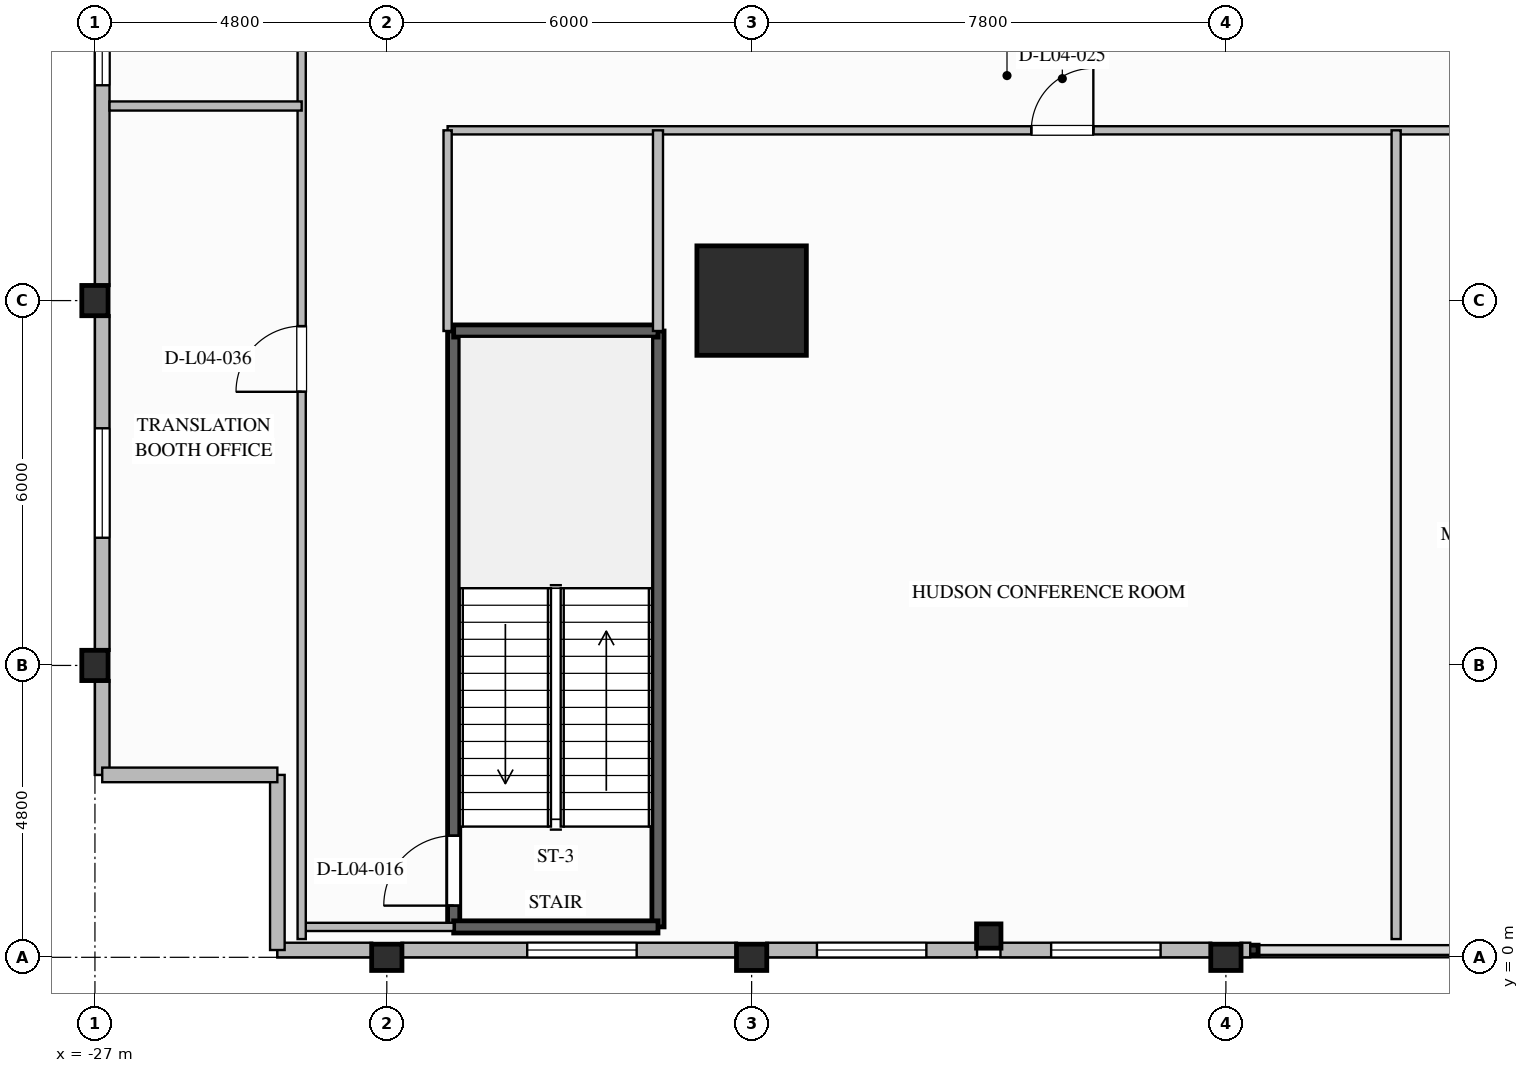
"""IFC4 building model, lengths in metres.
Left out: names, types, materials, properties, quantities, classifications, styles, units other than length and angle.
Written with IfcOpenShell. Run it as: python <this file> out.ifc"""

import sys

from ifc_helpers import new_model, si_unit, direction, frame, frame_2d, origin, origin_2d, place, context, subcontext, project, spatial, rectangle, i_section, extrude, element, fill, save


model = new_model("IFC4")
c1 = context("Model", 3, precision=1e-05, world=origin(), true_north=direction((0.0, 1.0)))
c2 = subcontext(c1, "Body", "Model", "MODEL_VIEW")
j1 = project(units=[si_unit("LENGTHUNIT", "METRE"), si_unit("PLANEANGLEUNIT", "RADIAN")], contexts=[c1])
p1 = place(None, origin())
s1 = spatial("IfcSite", under=j1, at=p1, CompositionType="ELEMENT")
p2 = place(p1, origin())
s2 = spatial("IfcBuilding", under=s1, at=p2, CompositionType="ELEMENT")
p3 = place(p2, frame((0.0, 0.0, 22.4)))
s3 = spatial("IfcBuildingStorey", under=s2, at=p3, CompositionType="ELEMENT", Elevation=22.4)
p4 = place(p3, frame((-16.2, 10.8, 0.0), z_axis=(0.0, 0.0, 1.0), x_axis=(1.0, 0.0, 0.0)))
e1 = element("IfcColumn", 1, at=p4, inside=s3, PredefinedType="COLUMN", context=c2, shape_type="SweptSolid", body=[
    extrude(rectangle(XDim=1.8, YDim=1.8, at=origin_2d()), origin(), (0.0, 0.0, 1.0), 5.2),
])
for number, where, z_axis, x_axis in (
    (2, (-27.0, 4.8, 0.0), (0.0, 0.0, 1.0), (1.0, 0.0, 0.0)),
    (3, (-27.0, 10.8, 0.0), (0.0, 0.0, 1.0), (1.0, 0.0, 0.0)),
    (4, (-22.2, 0.0, 0.0), (0.0, 0.0, 1.0), (0.0, 1.0, 0.0)),
    (5, (-16.2, 0.0, 0.0), (0.0, 0.0, 1.0), (0.0, 1.0, 0.0)),
    (6, (-8.4, 0.0, 0.0), (0.0, 0.0, 1.0), (0.0, 1.0, 0.0)),
):
    element("IfcColumn", number, at=place(p3, frame(where, z_axis=z_axis, x_axis=x_axis)), inside=s3, PredefinedType="COLUMN", context=c2, shape_type="SweptSolid", body=[
        extrude(i_section(OverallWidth=0.432, OverallDepth=0.498, WebThickness=0.056, FlangeThickness=0.089, FilletRadius=0.03, at=origin_2d()), origin(), (0.0, 0.0, 1.0), 5.2),
    ])
p5 = place(p3, frame((-12.3, 0.35, 0.0), z_axis=(0.0, 0.0, 1.0), x_axis=(1.0, 0.0, 0.0)))
e7 = element("IfcColumn", 7, at=p5, inside=s3, PredefinedType="COLUMN", context=c2, shape_type="SweptSolid", body=[
    extrude(i_section(OverallWidth=0.401, OverallDepth=0.399, WebThickness=0.025, FlangeThickness=0.04, FilletRadius=0.025, at=origin_2d()), origin(), (0.0, 0.0, 1.0), 5.2),
])
p6 = place(p3, frame((-26.88, 3.0, 0.0), z_axis=(0.0, 0.0, 1.0), x_axis=(0.0, 1.0, 0.0)))
e8 = element("IfcWall", 8, at=p6, inside=s3, PredefinedType="STANDARD", context=c2, shape_type="SweptSolid", body=[
    extrude(rectangle(XDim=1.559, YDim=0.24, at=frame_2d((0.78, 0.0))), origin(), (0.0, 0.0, 1.0), 4.85),
])
p7 = place(p3, frame((-26.88, 5.041, 0.0), z_axis=(0.0, 0.0, 1.0), x_axis=(0.0, 1.0, 0.0)))
e9 = element("IfcWall", 9, at=p7, inside=s3, PredefinedType="STANDARD", context=c2, shape_type="SweptSolid", body=[
    extrude(rectangle(XDim=5.518, YDim=0.24, at=frame_2d((2.759, 0.0))), origin(), (0.0, 0.0, 1.0), 4.155),
])
p8 = place(p7, frame((1.859, 0.0, 0.7)))
e10 = element("IfcOpeningElement", 10, at=p8, cuts=e9, PredefinedType="OPENING", context=c2, shape_type="SweptSolid", body=[
    extrude(rectangle(XDim=1.8, YDim=2.2, at=frame_2d((0.9, 1.1))), frame((0.0, 0.13, 0.0), z_axis=(0.0, -1.0, 0.0), x_axis=(1.0, 0.0, 0.0)), (0.0, 0.0, 1.0), 0.26),
])
p9 = place(p3, frame((-26.88, 11.041, 0.0), z_axis=(0.0, 0.0, 1.0), x_axis=(0.0, 1.0, 0.0)))
e11 = element("IfcWall", 11, at=p9, inside=s3, PredefinedType="STANDARD", context=c2, shape_type="SweptSolid", body=[
    extrude(rectangle(XDim=7.318, YDim=0.24, at=frame_2d((3.659, 0.0))), origin(), (0.0, 0.0, 1.0), 4.155),
])
p10 = place(p9, frame((3.3, 0.0, 0.7)))
e12 = element("IfcOpeningElement", 12, at=p10, cuts=e11, PredefinedType="OPENING", context=c2, shape_type="SweptSolid", body=[
    extrude(rectangle(XDim=2.4, YDim=2.4, at=frame_2d((1.2, 1.2))), frame((0.0, 0.13, 0.0), z_axis=(0.0, -1.0, 0.0), x_axis=(1.0, 0.0, 0.0)), (0.0, 0.0, 1.0), 0.26),
])
p11 = place(p3, frame((-22.441, 0.12, 0.0), z_axis=(0.0, 0.0, 1.0), x_axis=(-1.0, 0.0, 0.0)))
e13 = element("IfcWall", 13, at=p11, inside=s3, PredefinedType="STANDARD", context=c2, shape_type="SweptSolid", body=[
    extrude(rectangle(XDim=1.559, YDim=0.24, at=frame_2d((0.78, 0.0))), origin(), (0.0, 0.0, 1.0), 4.85),
])
p12 = place(p3, frame((-16.441, 0.12, 0.0), z_axis=(0.0, 0.0, 1.0), x_axis=(-1.0, 0.0, 0.0)))
e14 = element("IfcWall", 14, at=p12, inside=s3, PredefinedType="STANDARD", context=c2, shape_type="SweptSolid", body=[
    extrude(rectangle(XDim=5.518, YDim=0.24, at=frame_2d((2.759, 0.0))), origin(), (0.0, 0.0, 1.0), 4.155),
])
p13 = place(p12, frame((1.65, 0.0, 0.65)))
e15 = element("IfcOpeningElement", 15, at=p13, cuts=e14, PredefinedType="OPENING", context=c2, shape_type="SweptSolid", body=[
    extrude(rectangle(XDim=1.8, YDim=2.2, at=frame_2d((0.9, 1.1))), frame((0.0, 0.13, 0.0), z_axis=(0.0, -1.0, 0.0), x_axis=(1.0, 0.0, 0.0)), (0.0, 0.0, 1.0), 0.26),
])
p14 = place(p3, frame((-12.493, 0.12, 0.0), z_axis=(0.0, 0.0, 1.0), x_axis=(-1.0, 0.0, 0.0)))
e16 = element("IfcWall", 16, at=p14, inside=s3, PredefinedType="STANDARD", context=c2, shape_type="SweptSolid", body=[
    extrude(rectangle(XDim=3.466, YDim=0.24, at=frame_2d((1.733, 0.0))), origin(), (0.0, 0.0, 1.0), 4.155),
])
p15 = place(p14, frame((0.833, 0.0, 0.65)))
e17 = element("IfcOpeningElement", 17, at=p15, cuts=e16, PredefinedType="OPENING", context=c2, shape_type="SweptSolid", body=[
    extrude(rectangle(XDim=1.8, YDim=2.2, at=frame_2d((0.9, 1.1))), frame((0.0, 0.13, 0.0), z_axis=(0.0, -1.0, 0.0), x_axis=(1.0, 0.0, 0.0)), (0.0, 0.0, 1.0), 0.26),
])
p16 = place(p3, frame((-8.641, 0.12, 0.0), z_axis=(0.0, 0.0, 1.0), x_axis=(-1.0, 0.0, 0.0)))
e18 = element("IfcWall", 18, at=p16, inside=s3, PredefinedType="STANDARD", context=c2, shape_type="SweptSolid", body=[
    extrude(rectangle(XDim=3.467, YDim=0.24, at=frame_2d((1.733, 0.0))), origin(), (0.0, 0.0, 1.0), 4.155),
])
p17 = place(p16, frame((0.833, 0.0, 0.65)))
e19 = element("IfcOpeningElement", 19, at=p17, cuts=e18, PredefinedType="OPENING", context=c2, shape_type="SweptSolid", body=[
    extrude(rectangle(XDim=1.8, YDim=2.2, at=frame_2d((0.9, 1.1))), frame((0.0, 0.13, 0.0), z_axis=(0.0, -1.0, 0.0), x_axis=(1.0, 0.0, 0.0)), (0.0, 0.0, 1.0), 0.26),
])
p18 = place(p3, frame((-8.0, 0.12, 0.0), z_axis=(0.0, 0.0, 1.0), x_axis=(-1.0, 0.0, 0.0)))
e20 = element("IfcWall", 20, at=p18, inside=s3, PredefinedType="STANDARD", context=c2, shape_type="SweptSolid", body=[
    extrude(rectangle(XDim=0.159, YDim=0.24, at=frame_2d((0.08, 0.0))), origin(), (0.0, 0.0, 1.0), 4.85),
])
for number, where, z_axis, x_axis in (
    (21, (-24.0, 0.12, 0.0), (0.0, 0.0, 1.0), (0.0, 1.0, 0.0)),
    (22, (-24.0, 3.0, 0.0), (0.0, 0.0, 1.0), (-1.0, 0.0, 0.0)),
):
    element("IfcWall", number, at=place(p3, frame(where, z_axis=z_axis, x_axis=x_axis)), inside=s3, PredefinedType="STANDARD", context=c2, shape_type="SweptSolid", body=[
        extrude(rectangle(XDim=2.88, YDim=0.24, at=frame_2d((1.44, 0.0))), origin(), (0.0, 0.0, 1.0), 4.85),
    ])
p19 = place(p3, frame((-21.1, 0.5, 0.0), z_axis=(0.0, 0.0, 1.0), x_axis=(0.0, 1.0, 0.0)))
e23 = element("IfcWall", 23, at=p19, inside=s3, PredefinedType="SOLIDWALL", context=c2, shape_type="SweptSolid", body=[
    extrude(rectangle(XDim=9.8, YDim=0.2, at=frame_2d((4.9, 0.0))), origin(), (0.0, 0.0, 1.0), 4.85),
])
p20 = place(p19, frame((0.35, 0.0, 0.0)))
e24 = element("IfcOpeningElement", 24, at=p20, cuts=e23, PredefinedType="OPENING", context=c2, shape_type="SweptSolid", body=[
    extrude(rectangle(XDim=1.15, YDim=2.15, at=frame_2d((0.575, 1.075))), frame((0.0, 0.11, 0.0), z_axis=(0.0, -1.0, 0.0), x_axis=(1.0, 0.0, 0.0)), (0.0, 0.0, 1.0), 0.22),
])
p21 = place(p3, frame((-17.74, 10.3, 0.0), z_axis=(0.0, 0.0, 1.0), x_axis=(0.0, -1.0, 0.0)))
e25 = element("IfcWall", 25, at=p21, inside=s3, PredefinedType="SOLIDWALL", context=c2, shape_type="SweptSolid", body=[
    extrude(rectangle(XDim=9.8, YDim=0.2, at=frame_2d((4.9, 0.0))), origin(), (0.0, 0.0, 1.0), 4.85),
])
for number, where, z_axis, x_axis in (
    (26, (-21.1, 0.5, 0.0), (0.0, 0.0, 1.0), (1.0, 0.0, 0.0)),
    (27, (-17.74, 10.3, 0.0), (0.0, 0.0, 1.0), (-1.0, 0.0, 0.0)),
):
    element("IfcWall", number, at=place(p3, frame(where, z_axis=z_axis, x_axis=x_axis)), inside=s3, PredefinedType="SOLIDWALL", context=c2, shape_type="SweptSolid", body=[
        extrude(rectangle(XDim=3.36, YDim=0.2, at=frame_2d((1.68, 0.0))), origin(), (0.0, 0.0, 1.0), 4.85),
    ])
p22 = place(p3, frame((-21.2, 13.6, 0.0), z_axis=(0.0, 0.0, 1.0), x_axis=(1.0, 0.0, 0.0)))
e28 = element("IfcWall", 28, at=p22, inside=s3, PredefinedType="PARTITIONING", context=c2, shape_type="SweptSolid", body=[
    extrude(rectangle(XDim=46.3, YDim=0.135, at=frame_2d((23.15, 0.0))), origin(), (0.0, 0.0, 1.0), 4.85),
])
p23 = place(p22, frame((9.6, 0.0, 0.0)))
e29 = element("IfcOpeningElement", 29, at=p23, cuts=e28, PredefinedType="OPENING", context=c2, shape_type="SweptSolid", body=[
    extrude(rectangle(XDim=1.02, YDim=2.15, at=frame_2d((0.51, 1.075))), frame((0.0, 0.077, 0.0), z_axis=(0.0, -1.0, 0.0), x_axis=(1.0, 0.0, 0.0)), (0.0, 0.0, 1.0), 0.155),
])
p24 = place(p22, frame((19.1, 0.0, 0.0)))
e30 = element("IfcOpeningElement", 30, at=p24, cuts=e28, PredefinedType="OPENING", context=c2, shape_type="SweptSolid", body=[
    extrude(rectangle(XDim=1.02, YDim=2.15, at=frame_2d((0.51, 1.075))), frame((0.0, 0.077, 0.0), z_axis=(0.0, -1.0, 0.0), x_axis=(1.0, 0.0, 0.0)), (0.0, 0.0, 1.0), 0.155),
])
p25 = place(p22, frame((26.3, 0.0, 0.0)))
e31 = element("IfcOpeningElement", 31, at=p25, cuts=e28, PredefinedType="OPENING", context=c2, shape_type="SweptSolid", body=[
    extrude(rectangle(XDim=1.02, YDim=2.15, at=frame_2d((0.51, 1.075))), frame((0.0, 0.077, 0.0), z_axis=(0.0, -1.0, 0.0), x_axis=(1.0, 0.0, 0.0)), (0.0, 0.0, 1.0), 0.155),
])
p26 = place(p22, frame((34.0, 0.0, 0.0)))
e32 = element("IfcOpeningElement", 32, at=p26, cuts=e28, PredefinedType="OPENING", context=c2, shape_type="SweptSolid", body=[
    extrude(rectangle(XDim=1.02, YDim=2.15, at=frame_2d((0.51, 1.075))), frame((0.0, 0.077, 0.0), z_axis=(0.0, -1.0, 0.0), x_axis=(1.0, 0.0, 0.0)), (0.0, 0.0, 1.0), 0.155),
])
p27 = place(p22, frame((41.4, 0.0, 0.0)))
e33 = element("IfcOpeningElement", 33, at=p27, cuts=e28, PredefinedType="OPENING", context=c2, shape_type="SweptSolid", body=[
    extrude(rectangle(XDim=1.02, YDim=2.15, at=frame_2d((0.51, 1.075))), frame((0.0, 0.077, 0.0), z_axis=(0.0, -1.0, 0.0), x_axis=(1.0, 0.0, 0.0)), (0.0, 0.0, 1.0), 0.155),
])
p28 = place(p3, frame((-17.74, 10.3, 0.0), z_axis=(0.0, 0.0, 1.0), x_axis=(0.0, 1.0, 0.0)))
e34 = element("IfcWall", 34, at=p28, inside=s3, PredefinedType="PARTITIONING", context=c2, shape_type="SweptSolid", body=[
    extrude(rectangle(XDim=3.3, YDim=0.165, at=frame_2d((1.65, 0.0))), origin(), (0.0, 0.0, 1.0), 4.85),
])
p29 = place(p3, frame((-21.2, 10.3, 0.0), z_axis=(0.0, 0.0, 1.0), x_axis=(0.0, 1.0, 0.0)))
e35 = element("IfcWall", 35, at=p29, inside=s3, PredefinedType="PARTITIONING", context=c2, shape_type="SweptSolid", body=[
    extrude(rectangle(XDim=3.3, YDim=0.135, at=frame_2d((1.65, 0.0))), origin(), (0.0, 0.0, 1.0), 4.85),
])
p30 = place(p3, frame((-23.6, 0.5, 0.0), z_axis=(0.0, 0.0, 1.0), x_axis=(1.0, 0.0, 0.0)))
e36 = element("IfcWall", 36, at=p30, inside=s3, PredefinedType="PARTITIONING", context=c2, shape_type="SweptSolid", body=[
    extrude(rectangle(XDim=2.5, YDim=0.135, at=frame_2d((1.25, 0.0))), origin(), (0.0, 0.0, 1.0), 4.85),
])
p31 = place(p3, frame((-23.6, 0.3, 0.0), z_axis=(0.0, 0.0, 1.0), x_axis=(0.0, 1.0, 0.0)))
e37 = element("IfcWall", 37, at=p31, inside=s3, PredefinedType="PARTITIONING", context=c2, shape_type="SweptSolid", body=[
    extrude(rectangle(XDim=40.1, YDim=0.135, at=frame_2d((20.05, 0.0))), origin(), (0.0, 0.0, 1.0), 4.85),
])
p32 = place(p31, frame((19.0, 0.0, 0.0)))
e38 = element("IfcOpeningElement", 38, at=p32, cuts=e37, PredefinedType="OPENING", context=c2, shape_type="SweptSolid", body=[
    extrude(rectangle(XDim=1.02, YDim=2.15, at=frame_2d((0.51, 1.075))), frame((0.0, 0.077, 0.0), z_axis=(0.0, -1.0, 0.0), x_axis=(1.0, 0.0, 0.0)), (0.0, 0.0, 1.0), 0.155),
])
p33 = place(p31, frame((28.5, 0.0, 0.0)))
e39 = element("IfcOpeningElement", 39, at=p33, cuts=e37, PredefinedType="OPENING", context=c2, shape_type="SweptSolid", body=[
    extrude(rectangle(XDim=1.02, YDim=2.15, at=frame_2d((0.51, 1.075))), frame((0.0, 0.077, 0.0), z_axis=(0.0, -1.0, 0.0), x_axis=(1.0, 0.0, 0.0)), (0.0, 0.0, 1.0), 0.155),
])
p34 = place(p31, frame((9.0, 0.0, 0.0)))
e40 = element("IfcOpeningElement", 40, at=p34, cuts=e37, PredefinedType="OPENING", context=c2, shape_type="SweptSolid", body=[
    extrude(rectangle(XDim=1.08, YDim=2.04, at=frame_2d((0.54, 1.02))), frame((0.0, 0.077, 0.0), z_axis=(0.0, -1.0, 0.0), x_axis=(1.0, 0.0, 0.0)), (0.0, 0.0, 1.0), 0.155),
])
p35 = place(p3, frame((-5.6, 0.3, 0.0), z_axis=(0.0, 0.0, 1.0), x_axis=(0.0, 1.0, 0.0)))
e41 = element("IfcWall", 41, at=p35, inside=s3, PredefinedType="PARTITIONING", context=c2, shape_type="SweptSolid", body=[
    extrude(rectangle(XDim=13.3, YDim=0.15, at=frame_2d((6.65, 0.0))), origin(), (0.0, 0.0, 1.0), 4.85),
])
p36 = place(p3, frame((-26.76, 14.0, 0.0), z_axis=(0.0, 0.0, 1.0), x_axis=(1.0, 0.0, 0.0)))
e42 = element("IfcWall", 42, at=p36, inside=s3, PredefinedType="PARTITIONING", context=c2, shape_type="SweptSolid", body=[
    extrude(rectangle(XDim=3.16, YDim=0.15, at=frame_2d((1.58, 0.0))), origin(), (0.0, 0.0, 1.0), 4.85),
])
p37 = place(p8, origin())
e43 = element("IfcWindow", 43, at=p37, inside=s3, PartitioningType="SINGLE_PANEL", PredefinedType="WINDOW", context=c2, shape_type="SweptSolid", body=[
    extrude(rectangle(XDim=1.8, YDim=2.2, at=frame_2d((0.9, 1.1))), frame((0.0, 0.03, 0.0), z_axis=(0.0, -1.0, 0.0), x_axis=(1.0, 0.0, 0.0)), (0.0, 0.0, 1.0), 0.06),
])
fill(e10, e43)
p38 = place(p10, origin())
e44 = element("IfcWindow", 44, at=p38, inside=s3, PartitioningType="SINGLE_PANEL", PredefinedType="WINDOW", context=c2, shape_type="SweptSolid", body=[
    extrude(rectangle(XDim=2.4, YDim=2.4, at=frame_2d((1.2, 1.2))), frame((0.0, 0.03, 0.0), z_axis=(0.0, -1.0, 0.0), x_axis=(1.0, 0.0, 0.0)), (0.0, 0.0, 1.0), 0.06),
])
fill(e12, e44)
p39 = place(p13, origin())
e45 = element("IfcWindow", 45, at=p39, inside=s3, PartitioningType="SINGLE_PANEL", PredefinedType="WINDOW", context=c2, shape_type="SweptSolid", body=[
    extrude(rectangle(XDim=1.8, YDim=2.2, at=frame_2d((0.9, 1.1))), frame((0.0, 0.03, 0.0), z_axis=(0.0, -1.0, 0.0), x_axis=(1.0, 0.0, 0.0)), (0.0, 0.0, 1.0), 0.06),
])
fill(e15, e45)
p40 = place(p15, origin())
e46 = element("IfcWindow", 46, at=p40, inside=s3, PartitioningType="SINGLE_PANEL", PredefinedType="WINDOW", context=c2, shape_type="SweptSolid", body=[
    extrude(rectangle(XDim=1.8, YDim=2.2, at=frame_2d((0.9, 1.1))), frame((0.0, 0.03, 0.0), z_axis=(0.0, -1.0, 0.0), x_axis=(1.0, 0.0, 0.0)), (0.0, 0.0, 1.0), 0.06),
])
fill(e17, e46)
p41 = place(p17, origin())
e47 = element("IfcWindow", 47, at=p41, inside=s3, PartitioningType="SINGLE_PANEL", PredefinedType="WINDOW", context=c2, shape_type="SweptSolid", body=[
    extrude(rectangle(XDim=1.8, YDim=2.2, at=frame_2d((0.9, 1.1))), frame((0.0, 0.03, 0.0), z_axis=(0.0, -1.0, 0.0), x_axis=(1.0, 0.0, 0.0)), (0.0, 0.0, 1.0), 0.06),
])
fill(e19, e47)
p42 = place(p20, origin())
e48 = element("IfcDoor", 48, at=p42, inside=s3, OperationType="SINGLE_SWING_LEFT", PredefinedType="DOOR", context=c2, shape_type="SweptSolid", body=[
    extrude(rectangle(XDim=1.15, YDim=2.15, at=frame_2d((0.575, 1.075))), frame((0.0, 0.025, 0.0), z_axis=(0.0, -1.0, 0.0), x_axis=(1.0, 0.0, 0.0)), (0.0, 0.0, 1.0), 0.05),
])
fill(e24, e48)
p43 = place(p23, origin())
e49 = element("IfcDoor", 49, at=p43, inside=s3, OperationType="SINGLE_SWING_RIGHT", PredefinedType="DOOR", context=c2, shape_type="SweptSolid", body=[
    extrude(rectangle(XDim=1.02, YDim=2.15, at=frame_2d((0.51, 1.075))), frame((0.0, 0.025, 0.0), z_axis=(0.0, -1.0, 0.0), x_axis=(1.0, 0.0, 0.0)), (0.0, 0.0, 1.0), 0.05),
])
fill(e29, e49)
p44 = place(p34, origin())
e50 = element("IfcDoor", 50, at=p44, inside=s3, OperationType="SINGLE_SWING_LEFT", PredefinedType="DOOR", context=c2, shape_type="SweptSolid", body=[
    extrude(rectangle(XDim=1.08, YDim=2.04, at=frame_2d((0.54, 1.02))), frame((0.0, 0.025, 0.0), z_axis=(0.0, -1.0, 0.0), x_axis=(1.0, 0.0, 0.0)), (0.0, 0.0, 1.0), 0.05),
])
fill(e40, e50)
save(model, sys.argv[1])
